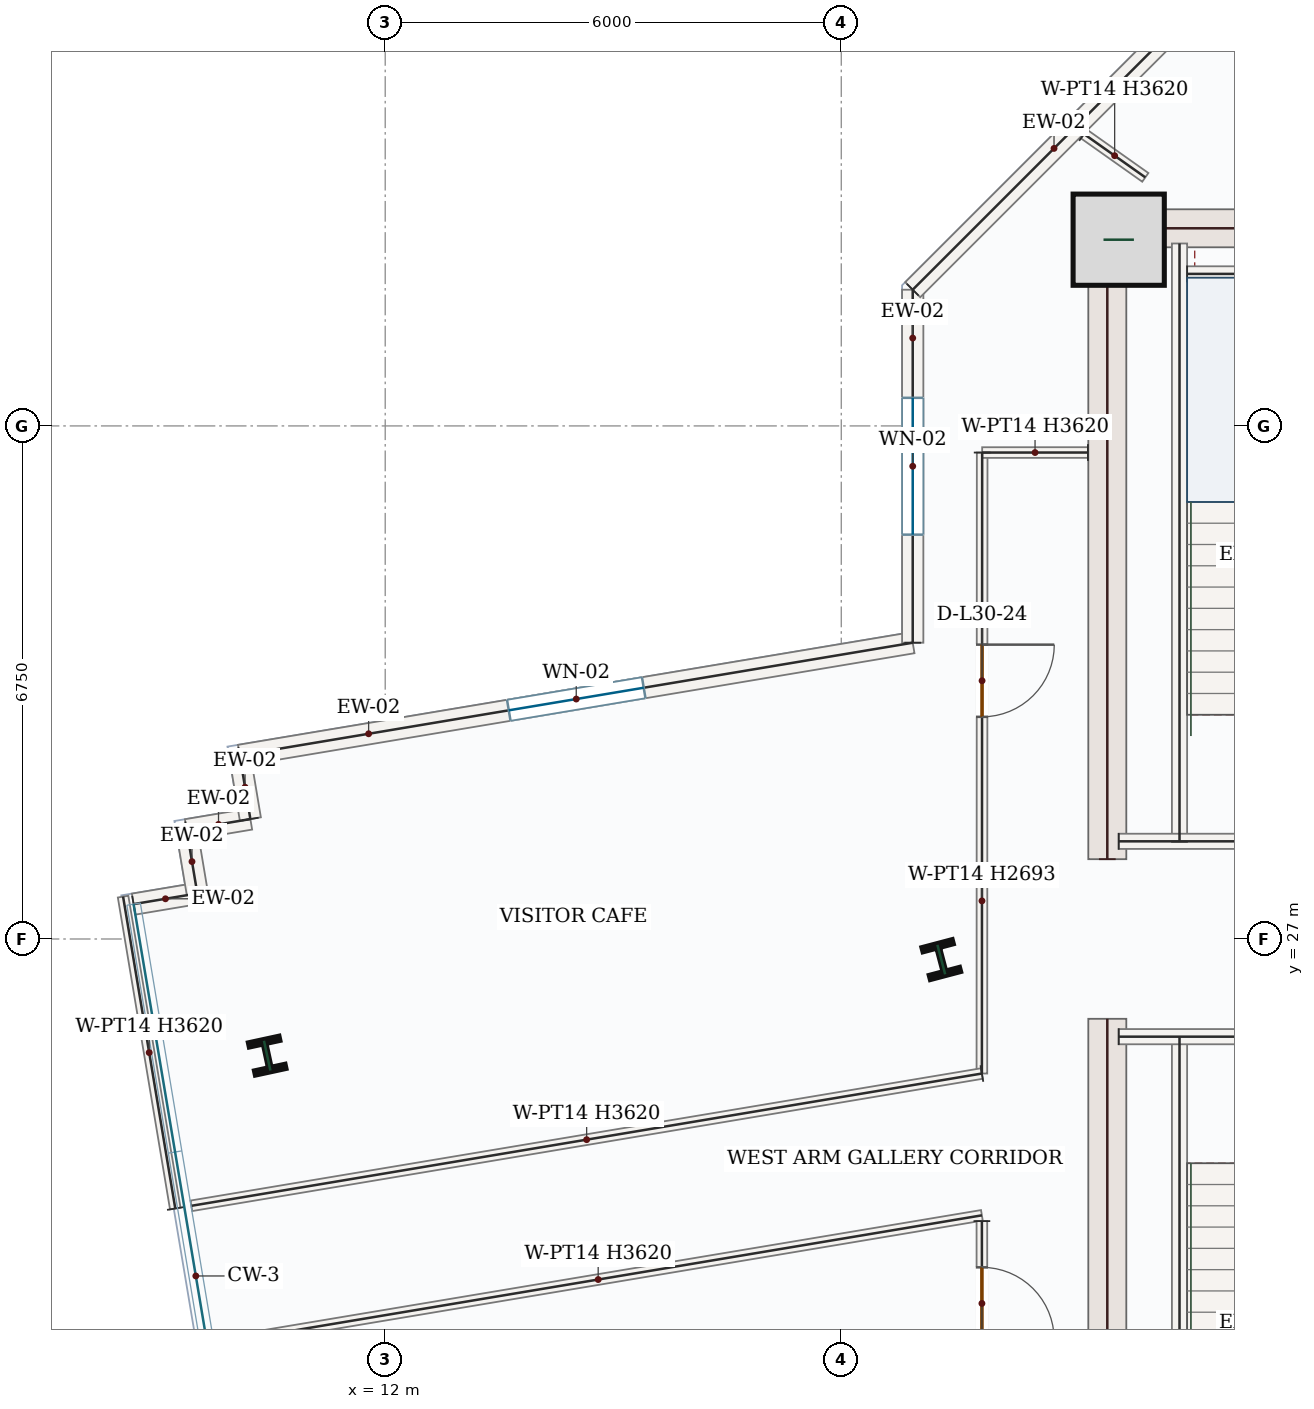
"""IFC4 building model, lengths in metres.
Left out: names, types, materials, properties, quantities, classifications, styles, units other than length and angle.
Written with IfcOpenShell. Run it as: python <this file> out.ifc"""

import sys

from ifc_helpers import new_model, si_unit, direction, frame, frame_2d, origin, origin_2d, place, context, subcontext, project, spatial, rectangle, i_section, extrude, source, transform, mapped, element, fill, save


model = new_model("IFC4")
c1 = context("Model", 3, precision=1e-05, world=origin(), true_north=direction((0.0, 1.0)))
c2 = subcontext(c1, "Body", "Model", "MODEL_VIEW")
j1 = project(units=[si_unit("LENGTHUNIT", "METRE"), si_unit("PLANEANGLEUNIT", "RADIAN")], contexts=[c1])
p1 = place(None, origin())
s1 = spatial("IfcSite", under=j1, at=p1, CompositionType="ELEMENT")
p2 = place(p1, origin())
s2 = spatial("IfcBuilding", under=s1, at=p2, CompositionType="ELEMENT")
p3 = place(p2, frame((0.0, 0.0, 135.6)))
s3 = spatial("IfcBuildingStorey", under=s2, at=p3, CompositionType="ELEMENT", Elevation=135.6)
m1 = source(origin(), c2, "Body", "SweptSolid", [
    extrude(rectangle(XDim=8.55, YDim=0.5, at=frame_2d((4.275, 0.0))), origin(), (0.0, 0.0, 1.0), 3.62),
])
for number, where, z_axis, x_axis in (
    (1, (21.5, 17.4, 0.0), (0.0, 0.0, 1.0), (0.0, 1.0, 0.0)),
    (2, (21.5, 28.05, 0.0), (0.0, 0.0, 1.0), (0.0, 1.0, 0.0)),
):
    element("IfcWall", number, at=place(p3, frame(where, z_axis=z_axis, x_axis=x_axis)), inside=s3, PredefinedType="SHEAR", context=c2, shape_type="MappedRepresentation", body=[
        mapped(m1, transform((0.0, 0.0, 0.0), x_axis=(1.0, 0.0, 0.0), y_axis=(0.0, 1.0, 0.0), z_axis=(0.0, 0.0, 1.0), scale=1.0)),
    ])
m2 = source(origin(), c2, "Body", "SweptSolid", [
    extrude(rectangle(XDim=7.0, YDim=0.5, at=frame_2d((3.5, 0.0))), origin(), (0.0, 0.0, 1.0), 3.62),
])
p4 = place(p3, frame((21.75, 36.35, 0.0), z_axis=(0.0, 0.0, 1.0), x_axis=(1.0, 0.0, 0.0)))
e3 = element("IfcWall", 3, at=p4, inside=s3, PredefinedType="SHEAR", context=c2, shape_type="MappedRepresentation", body=[
    mapped(m2, transform((0.0, 0.0, 0.0), x_axis=(1.0, 0.0, 0.0), y_axis=(0.0, 1.0, 0.0), z_axis=(0.0, 0.0, 1.0), scale=1.0)),
])
m3 = source(origin(), c2, "Body", "SweptSolid", [
    extrude(rectangle(XDim=1.2, YDim=1.2, at=origin_2d()), origin(), (0.0, 0.0, 1.0), 3.9),
])
p5 = place(p3, frame((21.65, 36.2, 0.0), z_axis=(0.0, 0.0, 1.0), x_axis=(1.0, 0.0, 0.0)))
e4 = element("IfcColumn", 4, at=p5, inside=s3, PredefinedType="COLUMN", context=c2, shape_type="MappedRepresentation", body=[
    mapped(m3, transform((0.0, 0.0, 0.0), x_axis=(1.0, 0.0, 0.0), y_axis=(0.0, 1.0, 0.0), z_axis=(0.0, 0.0, 1.0), scale=1.0)),
])
m4 = source(origin(), c2, "Body", "SweptSolid", [
    extrude(i_section(OverallWidth=0.412, OverallDepth=0.435, WebThickness=0.036, FlangeThickness=0.057, FilletRadius=0.018, at=origin_2d()), origin(), (0.0, 0.0, 1.0), 3.9),
])
for number, where, z_axis, x_axis in (
    (5, (19.316, 26.729, 0.0), (0.0, 0.0, 1.0), (0.967, 0.255, 0.0)),
    (6, (10.447, 25.465, 0.0), (0.0, 0.0, 1.0), (0.977, 0.211, 0.0)),
):
    element("IfcColumn", number, at=place(p3, frame(where, z_axis=z_axis, x_axis=x_axis)), inside=s3, PredefinedType="COLUMN", context=c2, shape_type="MappedRepresentation", body=[
        mapped(m4, transform((0.0, 0.0, 0.0), x_axis=(1.0, 0.0, 0.0), y_axis=(0.0, 1.0, 0.0), z_axis=(0.0, 0.0, 1.0), scale=1.0)),
    ])
m5 = source(origin(), c2, "Body", "SweptSolid", [
    extrude(rectangle(XDim=0.85, YDim=0.28, at=frame_2d((0.425, 0.0))), origin(), (0.0, 0.0, 1.0), 3.62),
])
for number, where, z_axis, x_axis in (
    (7, (8.69, 27.459, 0.0), (0.0, 0.0, 1.0), (0.986, 0.165, 0.0)),
    (8, (9.528, 27.599, 0.0), (0.0, 0.0, 1.0), (-0.165, 0.986, 0.0)),
    (9, (9.388, 28.438, 0.0), (0.0, 0.0, 1.0), (0.986, 0.165, 0.0)),
    (10, (10.226, 28.578, 0.0), (0.0, 0.0, 1.0), (-0.165, 0.986, 0.0)),
):
    element("IfcWall", number, at=place(p3, frame(where, z_axis=z_axis, x_axis=x_axis)), inside=s3, PredefinedType="SOLIDWALL", context=c2, shape_type="MappedRepresentation", body=[
        mapped(m5, transform((0.0, 0.0, 0.0), x_axis=(1.0, 0.0, 0.0), y_axis=(0.0, 1.0, 0.0), z_axis=(0.0, 0.0, 1.0), scale=1.0)),
    ])
p6 = place(p3, frame((10.086, 29.416, 0.0), z_axis=(0.0, 0.0, 1.0), x_axis=(0.98628492446, 0.165051651865, 0.0)))
e11 = element("IfcWall", 11, at=p6, inside=s3, PredefinedType="SOLIDWALL", context=c2, shape_type="SweptSolid", body=[
    extrude(rectangle(XDim=8.977, YDim=0.28, at=frame_2d((4.489, 0.0))), origin(), (0.0, 0.0, 1.0), 3.62),
])
p7 = place(p6, frame((3.589, 0.0, 0.85)))
e12 = element("IfcOpeningElement", 12, at=p7, cuts=e11, PredefinedType="OPENING", context=c2, shape_type="SweptSolid", body=[
    extrude(rectangle(XDim=1.8, YDim=1.75, at=frame_2d((0.9, 0.875))), frame((0.0, 0.15, 0.0), z_axis=(0.0, -1.0, 0.0), x_axis=(1.0, 0.0, 0.0)), (0.0, 0.0, 1.0), 0.3),
])
p8 = place(p3, frame((18.94, 30.898, 0.0), z_axis=(0.0, 0.0, 1.0), x_axis=(0.0, 1.0, 0.0)))
e13 = element("IfcWall", 13, at=p8, inside=s3, PredefinedType="SOLIDWALL", context=c2, shape_type="SweptSolid", body=[
    extrude(rectangle(XDim=4.644, YDim=0.28, at=frame_2d((2.322, 0.0))), origin(), (0.0, 0.0, 1.0), 3.62),
])
p9 = place(p8, frame((1.422, 0.0, 0.85)))
e14 = element("IfcOpeningElement", 14, at=p9, cuts=e13, PredefinedType="OPENING", context=c2, shape_type="SweptSolid", body=[
    extrude(rectangle(XDim=1.8, YDim=1.75, at=frame_2d((0.9, 0.875))), frame((0.0, 0.15, 0.0), z_axis=(0.0, -1.0, 0.0), x_axis=(1.0, 0.0, 0.0)), (0.0, 0.0, 1.0), 0.3),
])
m6 = source(origin(), c2, "Body", "SweptSolid", [
    extrude(rectangle(XDim=5.258, YDim=0.28, at=frame_2d((2.629, 0.0))), origin(), (0.0, 0.0, 1.0), 3.62),
])
p10 = place(p3, frame((18.94, 35.542, 0.0), z_axis=(0.0, 0.0, 1.0), x_axis=(0.707106781187, 0.707106781187, 0.0)))
e15 = element("IfcWall", 15, at=p10, inside=s3, PredefinedType="SOLIDWALL", context=c2, shape_type="MappedRepresentation", body=[
    mapped(m6, transform((0.0, 0.0, 0.0), x_axis=(1.0, 0.0, 0.0), y_axis=(0.0, 1.0, 0.0), z_axis=(0.0, 0.0, 1.0), scale=1.0)),
])
m7 = source(origin(), c2, "Body", "SweptSolid", [
    extrude(rectangle(XDim=7.87, YDim=0.2, at=frame_2d((3.935, 0.0))), origin(), (0.0, 0.0, 1.0), 3.62),
])
for number, where, z_axis, x_axis in (
    (16, (22.45, 17.85, 0.0), (0.0, 0.0, 1.0), (0.0, 1.0, 0.0)),
    (17, (22.45, 28.28, 0.0), (0.0, 0.0, 1.0), (0.0, 1.0, 0.0)),
):
    element("IfcWall", number, at=place(p3, frame(where, z_axis=z_axis, x_axis=x_axis)), inside=s3, PredefinedType="SOLIDWALL", context=c2, shape_type="MappedRepresentation", body=[
        mapped(m7, transform((0.0, 0.0, 0.0), x_axis=(1.0, 0.0, 0.0), y_axis=(0.0, 1.0, 0.0), z_axis=(0.0, 0.0, 1.0), scale=1.0)),
    ])
m8 = source(origin(), c2, "Body", "SweptSolid", [
    extrude(rectangle(XDim=4.25, YDim=0.2, at=frame_2d((2.125, 0.0))), origin(), (0.0, 0.0, 1.0), 3.62),
])
for number, where, z_axis, x_axis in (
    (18, (21.65, 25.715, 0.0), (0.0, 0.0, 1.0), (1.0, 0.0, 0.0)),
    (19, (21.65, 28.285, 0.0), (0.0, 0.0, 1.0), (1.0, 0.0, 0.0)),
):
    element("IfcWall", number, at=place(p3, frame(where, z_axis=z_axis, x_axis=x_axis)), inside=s3, PredefinedType="SOLIDWALL", context=c2, shape_type="MappedRepresentation", body=[
        mapped(m8, transform((0.0, 0.0, 0.0), x_axis=(1.0, 0.0, 0.0), y_axis=(0.0, 1.0, 0.0), z_axis=(0.0, 0.0, 1.0), scale=1.0)),
    ])
m9 = source(origin(), c2, "Body", "SweptSolid", [
    extrude(rectangle(XDim=3.25, YDim=0.2, at=frame_2d((1.625, 0.0))), origin(), (0.0, 0.0, 1.0), 3.62),
])
p11 = place(p3, frame((22.55, 35.75, 0.0), z_axis=(0.0, 0.0, 1.0), x_axis=(1.0, 0.0, 0.0)))
e20 = element("IfcWall", 20, at=p11, inside=s3, PredefinedType="SOLIDWALL", context=c2, shape_type="MappedRepresentation", body=[
    mapped(m9, transform((0.0, 0.0, 0.0), x_axis=(1.0, 0.0, 0.0), y_axis=(0.0, 1.0, 0.0), z_axis=(0.0, 0.0, 1.0), scale=1.0)),
])
p12 = place(p3, frame((19.854, 33.399, 0.0), z_axis=(0.0, 0.0, 1.0), x_axis=(-0.000448283031, -0.999999899521, 0.0)))
e21 = element("IfcWall", 21, at=p12, inside=s3, PredefinedType="PARTITIONING", context=c2, shape_type="SweptSolid", body=[
    extrude(rectangle(XDim=8.169, YDim=0.14, at=frame_2d((4.084, 0.0))), origin(), (0.0, 0.0, 1.0), 2.693),
])
p13 = place(p12, frame((2.527, 0.0, 0.0)))
e22 = element("IfcOpeningElement", 22, at=p13, cuts=e21, PredefinedType="OPENING", context=c2, shape_type="SweptSolid", body=[
    extrude(rectangle(XDim=0.95, YDim=2.15, at=frame_2d((0.475, 1.075))), frame((0.0, 0.08, 0.0), z_axis=(0.0, -1.0, 0.0), x_axis=(1.0, 0.0, 0.0)), (0.0, 0.0, 1.0), 0.16),
])
m10 = source(origin(), c2, "Body", "SweptSolid", [
    extrude(rectangle(XDim=10.544, YDim=0.14, at=frame_2d((5.272, 0.0))), origin(), (0.0, 0.0, 1.0), 3.62),
])
p14 = place(p3, frame((19.85, 25.23, 0.0), z_axis=(0.0, 0.0, 1.0), x_axis=(-0.986287336963, -0.165037235031, 0.0)))
e23 = element("IfcWall", 23, at=p14, inside=s3, PredefinedType="PARTITIONING", context=c2, shape_type="MappedRepresentation", body=[
    mapped(m10, transform((0.0, 0.0, 0.0), x_axis=(1.0, 0.0, 0.0), y_axis=(0.0, 1.0, 0.0), z_axis=(0.0, 0.0, 1.0), scale=1.0)),
])
m11 = source(origin(), c2, "Body", "SweptSolid", [
    extrude(rectangle(XDim=4.16, YDim=0.14, at=frame_2d((2.08, 0.0))), origin(), (0.0, 0.0, 1.0), 3.62),
])
p15 = place(p3, frame((9.238, 23.454, 0.0), z_axis=(0.0, 0.0, 1.0), x_axis=(-0.165027060507, 0.98628903943, 0.0)))
e24 = element("IfcWall", 24, at=p15, inside=s3, PredefinedType="PARTITIONING", context=c2, shape_type="MappedRepresentation", body=[
    mapped(m11, transform((0.0, 0.0, 0.0), x_axis=(1.0, 0.0, 0.0), y_axis=(0.0, 1.0, 0.0), z_axis=(0.0, 0.0, 1.0), scale=1.0)),
])
m12 = source(origin(), c2, "Body", "SweptSolid", [
    extrude(rectangle(XDim=0.988, YDim=0.14, at=frame_2d((0.494, 0.0))), origin(), (0.0, 0.0, 1.0), 3.62),
])
p16 = place(p3, frame((21.193, 37.59, 0.0), z_axis=(0.0, 0.0, 1.0), x_axis=(0.81652929337, -0.577304004029, 0.0)))
e25 = element("IfcWall", 25, at=p16, inside=s3, PredefinedType="PARTITIONING", context=c2, shape_type="MappedRepresentation", body=[
    mapped(m12, transform((0.0, 0.0, 0.0), x_axis=(1.0, 0.0, 0.0), y_axis=(0.0, 1.0, 0.0), z_axis=(0.0, 0.0, 1.0), scale=1.0)),
])
m13 = source(origin(), c2, "Body", "SweptSolid", [
    extrude(rectangle(XDim=1.391, YDim=0.14, at=frame_2d((0.696, 0.0))), origin(), (0.0, 0.0, 1.0), 3.62),
])
p17 = place(p3, frame((21.245, 33.4, 0.0), z_axis=(0.0, 0.0, 1.0), x_axis=(-0.999999938421, -0.00035093874, 0.0)))
e26 = element("IfcWall", 26, at=p17, inside=s3, PredefinedType="PARTITIONING", context=c2, shape_type="MappedRepresentation", body=[
    mapped(m13, transform((0.0, 0.0, 0.0), x_axis=(1.0, 0.0, 0.0), y_axis=(0.0, 1.0, 0.0), z_axis=(0.0, 0.0, 1.0), scale=1.0)),
])
m14 = source(origin(), c2, "Body", "SweptSolid", [
    extrude(rectangle(XDim=10.237, YDim=0.14, at=frame_2d((5.118, 0.0))), origin(), (0.0, 0.0, 1.0), 3.62),
])
p18 = place(p3, frame((9.754, 21.675, 0.0), z_axis=(0.0, 0.0, 1.0), x_axis=(0.986290594835, 0.165017764319, 0.0)))
e27 = element("IfcWall", 27, at=p18, inside=s3, PredefinedType="PARTITIONING", context=c2, shape_type="MappedRepresentation", body=[
    mapped(m14, transform((0.0, 0.0, 0.0), x_axis=(1.0, 0.0, 0.0), y_axis=(0.0, 1.0, 0.0), z_axis=(0.0, 0.0, 1.0), scale=1.0)),
])
p19 = place(p3, frame((19.85, 23.289, 0.0), z_axis=(0.0, 0.0, 1.0), x_axis=(0.000363372069, -0.99999993398, 0.0)))
e28 = element("IfcWall", 28, at=p19, inside=s3, PredefinedType="PARTITIONING", context=c2, shape_type="SweptSolid", body=[
    extrude(rectangle(XDim=2.688, YDim=0.14, at=frame_2d((1.344, 0.0))), origin(), (0.0, 0.0, 1.0), 3.079),
])
p20 = place(p19, frame((0.608, 0.0, 0.0)))
e29 = element("IfcOpeningElement", 29, at=p20, cuts=e28, PredefinedType="OPENING", context=c2, shape_type="SweptSolid", body=[
    extrude(rectangle(XDim=0.95, YDim=2.15, at=frame_2d((0.475, 1.075))), frame((0.0, 0.08, 0.0), z_axis=(0.0, -1.0, 0.0), x_axis=(1.0, 0.0, 0.0)), (0.0, 0.0, 1.0), 0.16),
])
m15 = source(origin(), c2, "Body", "SweptSolid", [
    extrude(rectangle(XDim=1.8, YDim=1.75, at=frame_2d((0.9, 0.875))), frame((0.0, 0.03, 0.0), z_axis=(0.0, -1.0, 0.0), x_axis=(1.0, 0.0, 0.0)), (0.0, 0.0, 1.0), 0.06),
])
p21 = place(p7, origin())
e30 = element("IfcWindow", 30, at=p21, inside=s3, PartitioningType="DOUBLE_PANEL_VERTICAL", PredefinedType="WINDOW", context=c2, shape_type="MappedRepresentation", body=[
    mapped(m15, transform((0.0, 0.0, 0.0), x_axis=(1.0, 0.0, 0.0), y_axis=(0.0, 1.0, 0.0), z_axis=(0.0, 0.0, 1.0), scale=1.0)),
])
fill(e12, e30)
p22 = place(p9, origin())
e31 = element("IfcWindow", 31, at=p22, inside=s3, PartitioningType="DOUBLE_PANEL_VERTICAL", PredefinedType="WINDOW", context=c2, shape_type="MappedRepresentation", body=[
    mapped(m15, transform((0.0, 0.0, 0.0), x_axis=(1.0, 0.0, 0.0), y_axis=(0.0, 1.0, 0.0), z_axis=(0.0, 0.0, 1.0), scale=1.0)),
])
fill(e14, e31)
m16 = source(origin(), c2, "Body", "SweptSolid", [
    extrude(rectangle(XDim=0.95, YDim=2.15, at=frame_2d((0.475, 1.075))), frame((0.0, 0.025, 0.0), z_axis=(0.0, -1.0, 0.0), x_axis=(1.0, 0.0, 0.0)), (0.0, 0.0, 1.0), 0.05),
])
p23 = place(p13, origin())
e32 = element("IfcDoor", 32, at=p23, inside=s3, OperationType="SINGLE_SWING_LEFT", PredefinedType="DOOR", context=c2, shape_type="MappedRepresentation", body=[
    mapped(m16, transform((0.0, 0.0, 0.0), x_axis=(1.0, 0.0, 0.0), y_axis=(0.0, 1.0, 0.0), z_axis=(0.0, 0.0, 1.0), scale=1.0)),
])
fill(e22, e32)
p24 = place(p20, origin())
e33 = element("IfcDoor", 33, at=p24, inside=s3, OperationType="SINGLE_SWING_RIGHT", PredefinedType="DOOR", context=c2, shape_type="MappedRepresentation", body=[
    mapped(m16, transform((0.0, 0.0, 0.0), x_axis=(1.0, 0.0, 0.0), y_axis=(0.0, 1.0, 0.0), z_axis=(0.0, 0.0, 1.0), scale=1.0)),
])
fill(e29, e33)
save(model, sys.argv[1])
